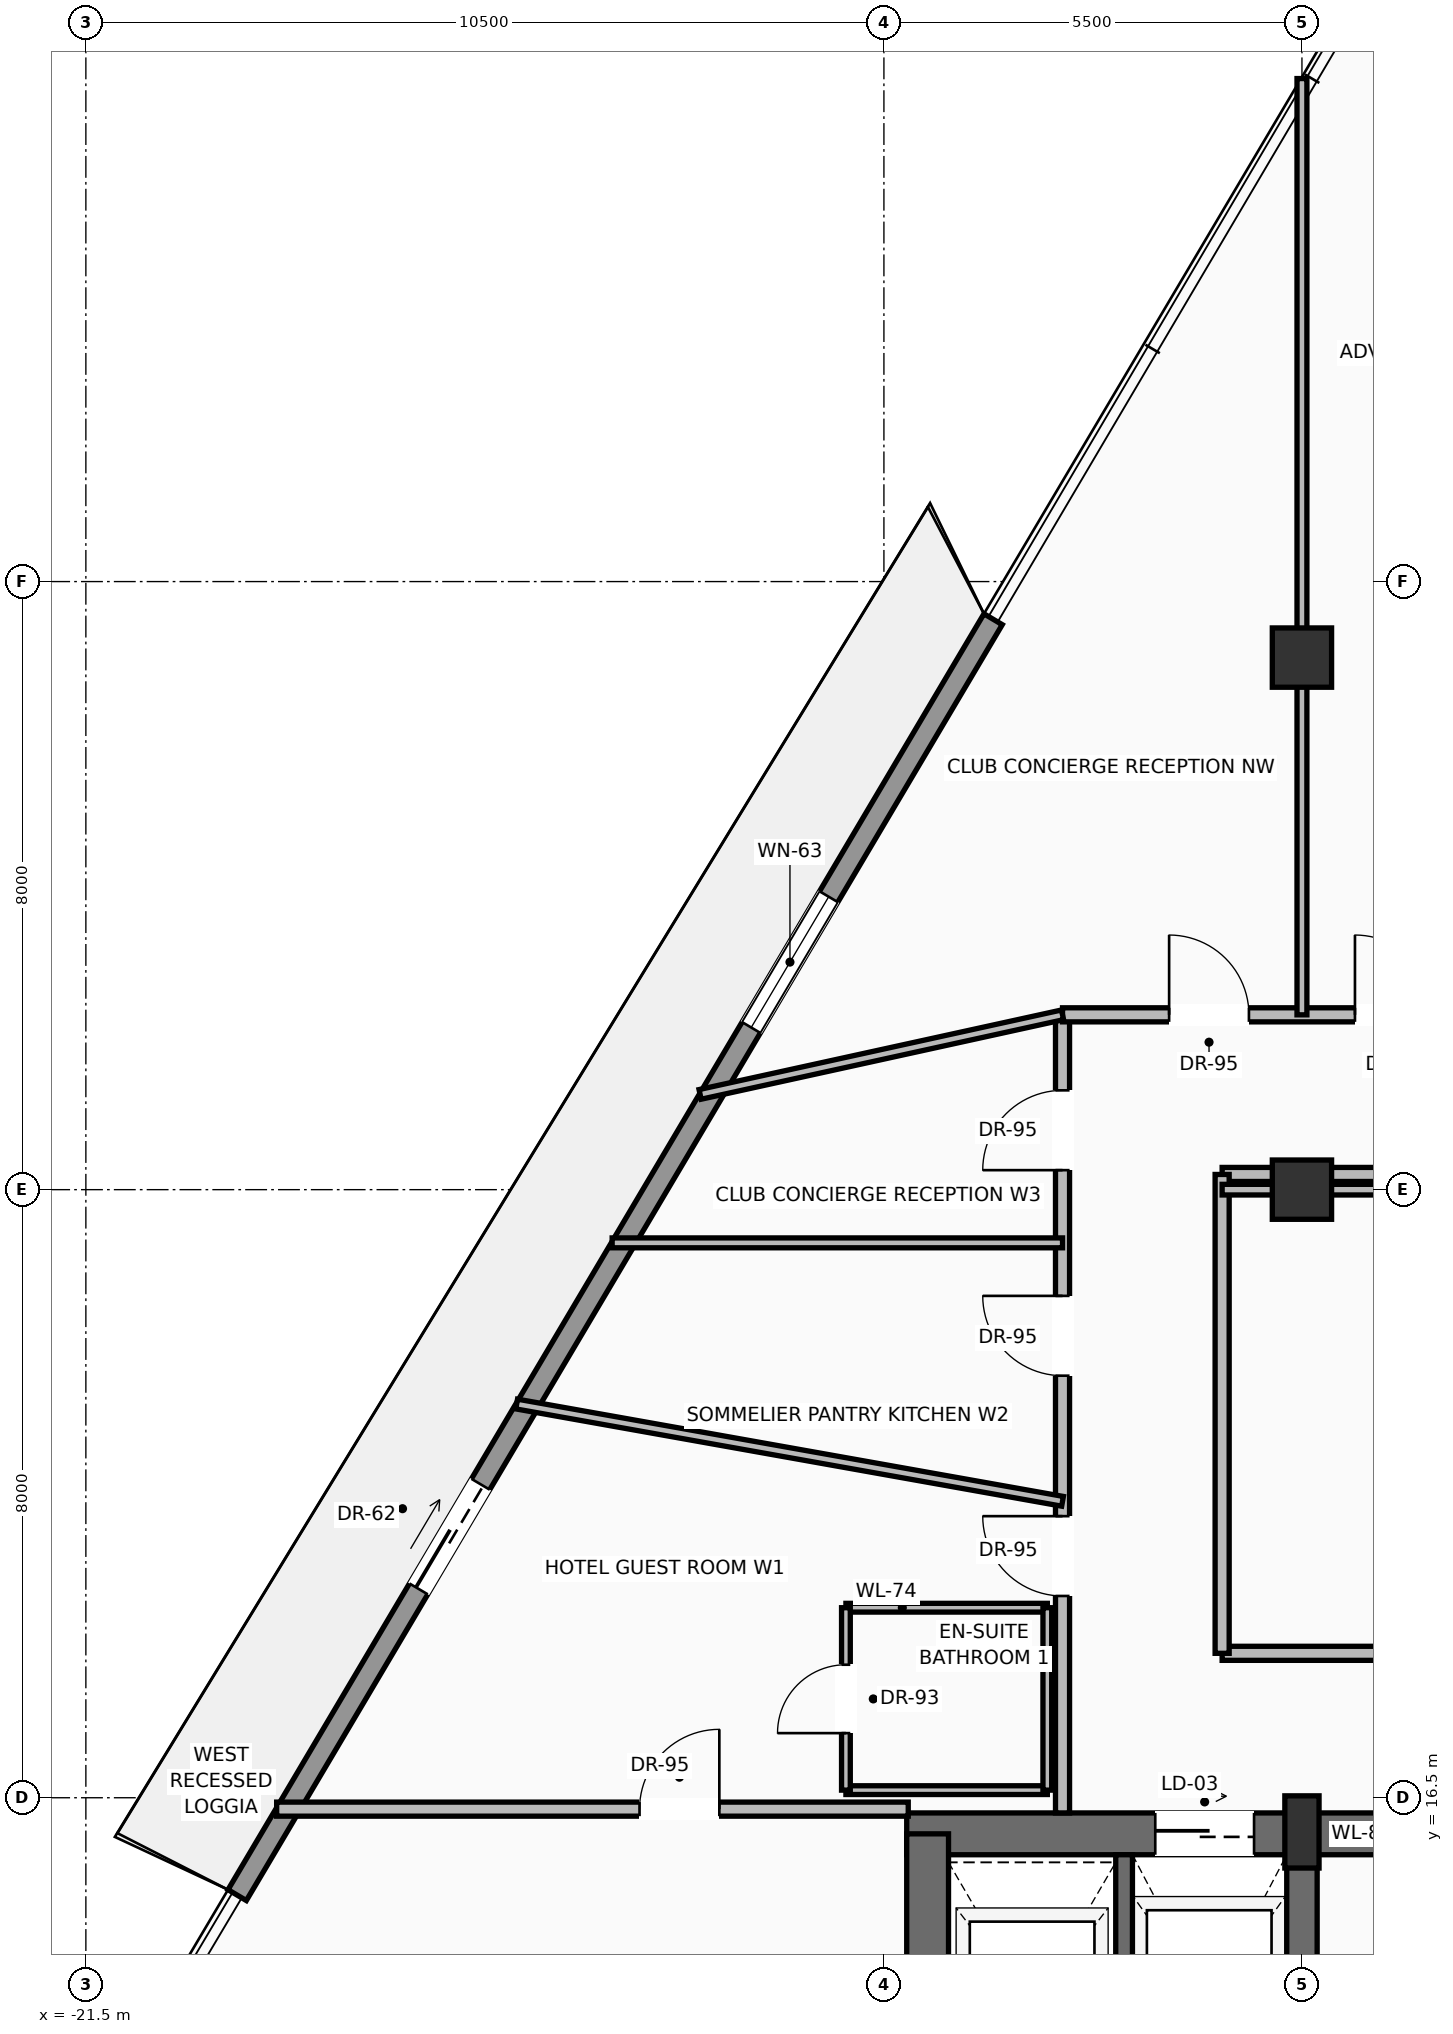
"""IFC4 building model, lengths in metres.
Left out: names, types, materials, properties, quantities, classifications, styles, units other than length and angle.
Written with IfcOpenShell. Run it as: python <this file> out.ifc"""

import sys

from ifc_helpers import new_model, si_unit, direction, frame, frame_2d, origin, origin_2d, place, context, subcontext, project, spatial, rectangle, extrude, source, transform, mapped, element, fill, save


model = new_model("IFC4")
c1 = context("Model", 3, precision=1e-05, world=origin(), true_north=direction((0.0, 1.0)))
c2 = subcontext(c1, "Body", "Model", "MODEL_VIEW")
j1 = project(units=[si_unit("LENGTHUNIT", "METRE"), si_unit("PLANEANGLEUNIT", "RADIAN")], contexts=[c1])
p1 = place(None, origin())
s1 = spatial("IfcSite", under=j1, at=p1, CompositionType="ELEMENT")
p2 = place(p1, origin())
s2 = spatial("IfcBuilding", under=s1, at=p2, CompositionType="ELEMENT")
p3 = place(p2, frame((0.0, 0.0, 233.8)))
s3 = spatial("IfcBuildingStorey", under=s2, at=p3, CompositionType="ELEMENT", Elevation=233.8)
p4 = place(p3, frame((-10.7, 16.025, 0.0), z_axis=(0.0, 0.0, 1.0), x_axis=(1.0, 0.0, 0.0)))
e1 = element("IfcWall", 1, at=p4, inside=s3, PredefinedType="SHEAR", context=c2, shape_type="SweptSolid", body=[
    extrude(rectangle(XDim=21.4, YDim=0.55, at=frame_2d((10.7, 0.0))), origin(), (0.0, 0.0, 1.0), 3.24),
])
p5 = place(p4, frame((3.27, 0.0, 0.0)))
e2 = element("IfcOpeningElement", 2, at=p5, cuts=e1, PredefinedType="OPENING", context=c2, shape_type="SweptSolid", body=[
    extrude(rectangle(XDim=1.3, YDim=2.3, at=frame_2d((0.65, 1.15))), frame((0.0, 0.285, 0.0), z_axis=(0.0, -1.0, 0.0), x_axis=(1.0, 0.0, 0.0)), (0.0, 0.0, 1.0), 0.57),
])
p6 = place(p4, frame((9.7, 0.0, 0.0)))
e3 = element("IfcOpeningElement", 3, at=p6, cuts=e1, PredefinedType="OPENING", context=c2, shape_type="SweptSolid", body=[
    extrude(rectangle(XDim=2.0, YDim=2.4, at=frame_2d((1.0, 1.2))), frame((0.0, 0.285, 0.0), z_axis=(0.0, -1.0, 0.0), x_axis=(1.0, 0.0, 0.0)), (0.0, 0.0, 1.0), 0.57),
])
p7 = place(p3, frame((-10.425, 0.575, 0.0), z_axis=(0.0, 0.0, 1.0), x_axis=(0.0, 1.0, 0.0)))
e4 = element("IfcWall", 4, at=p7, inside=s3, PredefinedType="SHEAR", context=c2, shape_type="SweptSolid", body=[
    extrude(rectangle(XDim=15.45, YDim=0.55, at=frame_2d((7.725, 0.0))), origin(), (0.0, 0.0, 1.0), 3.24),
])
p8 = place(p3, frame((-5.5, 0.575, 0.0), z_axis=(0.0, 0.0, 1.0), x_axis=(0.0, 1.0, 0.0)))
e5 = element("IfcWall", 5, at=p8, inside=s3, PredefinedType="SHEAR", context=c2, shape_type="SweptSolid", body=[
    extrude(rectangle(XDim=15.45, YDim=0.4, at=frame_2d((7.725, 0.0))), origin(), (0.0, 0.0, 1.0), 3.24),
])
p9 = place(p8, frame((8.925, 0.0, 0.0)))
e6 = element("IfcOpeningElement", 6, at=p9, cuts=e5, PredefinedType="OPENING", context=c2, shape_type="SweptSolid", body=[
    extrude(rectangle(XDim=1.1, YDim=2.2, at=frame_2d((0.55, 1.1))), frame((0.0, 0.21, 0.0), z_axis=(0.0, -1.0, 0.0), x_axis=(1.0, 0.0, 0.0)), (0.0, 0.0, 1.0), 0.42),
])
m1 = source(origin(), c2, "Body", "SweptSolid", [
    extrude(rectangle(XDim=0.45, YDim=0.95, at=origin_2d()), origin(), (0.0, 0.0, 1.0), 3.45),
])
p10 = place(p3, frame((-5.5, 16.05, 0.0), z_axis=(0.0, 0.0, 1.0), x_axis=(1.0, 0.0, 0.0)))
e7 = element("IfcColumn", 7, at=p10, inside=s3, PredefinedType="PILASTER", context=c2, shape_type="MappedRepresentation", body=[
    mapped(m1, transform((0.0, 0.0, 0.0), scale=1.0)),
])
m2 = source(origin(), c2, "Body", "SweptSolid", [
    extrude(rectangle(XDim=0.78, YDim=0.78, at=origin_2d()), origin(), (0.0, 0.0, 1.0), 3.45),
])
for number, where, z_axis, x_axis in (
    (8, (-5.5, 24.5, 0.0), (0.0, 0.0, 1.0), (1.0, 0.0, 0.0)),
    (9, (-5.5, 31.5, 0.0), (0.0, 0.0, 1.0), (1.0, 0.0, 0.0)),
):
    element("IfcColumn", number, at=place(p3, frame(where, z_axis=z_axis, x_axis=x_axis)), inside=s3, PredefinedType="COLUMN", context=c2, shape_type="MappedRepresentation", body=[
        mapped(m2, transform((0.0, 0.0, 0.0), scale=1.0)),
    ])
p11 = place(p3, frame((-19.509, 15.219, 0.0), z_axis=(0.0, 0.0, 1.0), x_axis=(0.509744081024, 0.860326084611, 0.0)))
e10 = element("IfcWall", 10, at=p11, inside=s3, PredefinedType="SOLIDWALL", context=c2, shape_type="SweptSolid", body=[
    extrude(rectangle(XDim=19.511, YDim=0.28, at=frame_2d((9.756, 0.0))), origin(), (0.0, 0.0, 1.0), 2.82),
])
p12 = place(p11, frame((4.683, 0.0, 0.0)))
e11 = element("IfcOpeningElement", 11, at=p12, cuts=e10, PredefinedType="OPENING", context=c2, shape_type="SweptSolid", body=[
    extrude(rectangle(XDim=1.6, YDim=2.35, at=frame_2d((0.8, 1.175))), frame((0.0, 0.15, 0.0), z_axis=(0.0, -1.0, 0.0), x_axis=(1.0, 0.0, 0.0)), (0.0, 0.0, 1.0), 0.3),
])
p13 = place(p11, frame((13.268, 0.0, 0.9)))
e12 = element("IfcOpeningElement", 12, at=p13, cuts=e10, PredefinedType="OPENING", context=c2, shape_type="SweptSolid", body=[
    extrude(rectangle(XDim=2.0, YDim=1.75, at=frame_2d((1.0, 0.875))), frame((0.0, 0.15, 0.0), z_axis=(0.0, -1.0, 0.0), x_axis=(1.0, 0.0, 0.0)), (0.0, 0.0, 1.0), 0.3),
])
p14 = place(p3, frame((-7.84, 11.87, 0.0), z_axis=(0.0, 0.0, 1.0), x_axis=(0.0, 1.0, 0.0)))
e13 = element("IfcWall", 13, at=p14, inside=s3, PredefinedType="SOLIDWALL", context=c2, shape_type="SweptSolid", body=[
    extrude(rectangle(XDim=3.88, YDim=0.22, at=frame_2d((1.94, 0.0))), origin(), (0.0, 0.0, 1.0), 3.24),
])
p15 = place(p3, frame((-6.55, 18.4, 0.0), z_axis=(0.0, 0.0, 1.0), x_axis=(1.0, 0.0, 0.0)))
e14 = element("IfcWall", 14, at=p15, inside=s3, PredefinedType="PARTITIONING", context=c2, shape_type="SweptSolid", body=[
    extrude(rectangle(XDim=12.4, YDim=0.185, at=frame_2d((6.2, 0.0))), origin(), (0.0, 0.0, 1.0), 3.232),
])
p16 = place(p15, frame((5.725, 0.0, 0.0)))
e15 = element("IfcOpeningElement", 15, at=p16, cuts=e14, PredefinedType="OPENING", context=c2, shape_type="SweptSolid", body=[
    extrude(rectangle(XDim=0.95, YDim=2.2, at=frame_2d((0.475, 1.1))), frame((0.0, 0.103, 0.0), z_axis=(0.0, -1.0, 0.0), x_axis=(1.0, 0.0, 0.0)), (0.0, 0.0, 1.0), 0.205),
])
p17 = place(p3, frame((-6.55, 24.7, 0.0), z_axis=(0.0, 0.0, 1.0), x_axis=(1.0, 0.0, 0.0)))
e16 = element("IfcWall", 16, at=p17, inside=s3, PredefinedType="PARTITIONING", context=c2, shape_type="SweptSolid", body=[
    extrude(rectangle(XDim=12.4, YDim=0.185, at=frame_2d((6.2, 0.0))), origin(), (0.0, 0.0, 1.0), 2.683),
])
p18 = place(p3, frame((-6.55, 18.4, 0.0), z_axis=(0.0, 0.0, 1.0), x_axis=(0.0, 1.0, 0.0)))
e17 = element("IfcWall", 17, at=p18, inside=s3, PredefinedType="PARTITIONING", context=c2, shape_type="SweptSolid", body=[
    extrude(rectangle(XDim=6.3, YDim=0.185, at=frame_2d((3.15, 0.0))), origin(), (0.0, 0.0, 1.0), 3.232),
])
p19 = place(p3, frame((-8.65, 16.3, 0.0), z_axis=(0.0, 0.0, 1.0), x_axis=(0.0, 1.0, 0.0)))
e18 = element("IfcWall", 18, at=p19, inside=s3, PredefinedType="PARTITIONING", context=c2, shape_type="SweptSolid", body=[
    extrude(rectangle(XDim=10.5, YDim=0.185, at=frame_2d((5.25, 0.0))), origin(), (0.0, 0.0, 1.0), 3.232),
])
p20 = place(p19, frame((2.854, 0.0, 0.0)))
e19 = element("IfcOpeningElement", 19, at=p20, cuts=e18, PredefinedType="OPENING", context=c2, shape_type="SweptSolid", body=[
    extrude(rectangle(XDim=1.05, YDim=2.25, at=frame_2d((0.525, 1.125))), frame((0.0, 0.103, 0.0), z_axis=(0.0, -1.0, 0.0), x_axis=(1.0, 0.0, 0.0)), (0.0, 0.0, 1.0), 0.205),
])
p21 = place(p19, frame((5.752, 0.0, 0.0)))
e20 = element("IfcOpeningElement", 20, at=p21, cuts=e18, PredefinedType="OPENING", context=c2, shape_type="SweptSolid", body=[
    extrude(rectangle(XDim=1.05, YDim=2.25, at=frame_2d((0.525, 1.125))), frame((0.0, 0.103, 0.0), z_axis=(0.0, -1.0, 0.0), x_axis=(1.0, 0.0, 0.0)), (0.0, 0.0, 1.0), 0.205),
])
p22 = place(p19, frame((8.457, 0.0, 0.0)))
e21 = element("IfcOpeningElement", 21, at=p22, cuts=e18, PredefinedType="OPENING", context=c2, shape_type="SweptSolid", body=[
    extrude(rectangle(XDim=1.05, YDim=2.25, at=frame_2d((0.525, 1.125))), frame((0.0, 0.103, 0.0), z_axis=(0.0, -1.0, 0.0), x_axis=(1.0, 0.0, 0.0)), (0.0, 0.0, 1.0), 0.205),
])
p23 = place(p3, frame((-8.65, 26.8, 0.0), z_axis=(0.0, 0.0, 1.0), x_axis=(1.0, 0.0, 0.0)))
e22 = element("IfcWall", 22, at=p23, inside=s3, PredefinedType="PARTITIONING", context=c2, shape_type="SweptSolid", body=[
    extrude(rectangle(XDim=16.6, YDim=0.185, at=frame_2d((8.3, 0.0))), origin(), (0.0, 0.0, 1.0), 3.232),
])
p24 = place(p23, frame((3.847, 0.0, 0.0)))
e23 = element("IfcOpeningElement", 23, at=p24, cuts=e22, PredefinedType="OPENING", context=c2, shape_type="SweptSolid", body=[
    extrude(rectangle(XDim=1.05, YDim=2.25, at=frame_2d((0.525, 1.125))), frame((0.0, 0.103, 0.0), z_axis=(0.0, -1.0, 0.0), x_axis=(1.0, 0.0, 0.0)), (0.0, 0.0, 1.0), 0.205),
])
p25 = place(p23, frame((6.903, 0.0, 0.0)))
e24 = element("IfcOpeningElement", 24, at=p25, cuts=e22, PredefinedType="OPENING", context=c2, shape_type="SweptSolid", body=[
    extrude(rectangle(XDim=1.05, YDim=2.25, at=frame_2d((0.525, 1.125))), frame((0.0, 0.103, 0.0), z_axis=(0.0, -1.0, 0.0), x_axis=(1.0, 0.0, 0.0)), (0.0, 0.0, 1.0), 0.205),
])
p26 = place(p23, frame((12.403, 0.0, 0.0)))
e25 = element("IfcOpeningElement", 25, at=p26, cuts=e22, PredefinedType="OPENING", context=c2, shape_type="SweptSolid", body=[
    extrude(rectangle(XDim=1.05, YDim=2.25, at=frame_2d((0.525, 1.125))), frame((0.0, 0.103, 0.0), z_axis=(0.0, -1.0, 0.0), x_axis=(1.0, 0.0, 0.0)), (0.0, 0.0, 1.0), 0.205),
])
p27 = place(p23, frame((1.403, 0.0, 0.0)))
e26 = element("IfcOpeningElement", 26, at=p27, cuts=e22, PredefinedType="OPENING", context=c2, shape_type="SweptSolid", body=[
    extrude(rectangle(XDim=1.05, YDim=2.25, at=frame_2d((0.525, 1.125))), frame((0.0, 0.103, 0.0), z_axis=(0.0, -1.0, 0.0), x_axis=(1.0, 0.0, 0.0)), (0.0, 0.0, 1.0), 0.205),
])
p28 = place(p3, frame((-6.55, 24.5, 0.0), z_axis=(0.0, 0.0, 1.0), x_axis=(1.0, 0.0, 0.0)))
e27 = element("IfcWall", 27, at=p28, inside=s3, PredefinedType="PARTITIONING", context=c2, shape_type="SweptSolid", body=[
    extrude(rectangle(XDim=12.4, YDim=0.14, at=frame_2d((6.2, 0.0))), origin(), (0.0, 0.0, 1.0), 2.683),
])
p29 = place(p3, frame((-18.99, 16.35, 0.0), z_axis=(0.0, 0.0, 1.0), x_axis=(1.0, 0.0, 0.0)))
e28 = element("IfcWall", 28, at=p29, inside=s3, PredefinedType="PARTITIONING", context=c2, shape_type="SweptSolid", body=[
    extrude(rectangle(XDim=8.31, YDim=0.185, at=frame_2d((4.155, 0.0))), origin(), (0.0, 0.0, 1.0), 3.232),
])
p30 = place(p29, frame((4.774, 0.0, 0.0)))
e29 = element("IfcOpeningElement", 29, at=p30, cuts=e28, PredefinedType="OPENING", context=c2, shape_type="SweptSolid", body=[
    extrude(rectangle(XDim=1.05, YDim=2.25, at=frame_2d((0.525, 1.125))), frame((0.0, 0.103, 0.0), z_axis=(0.0, -1.0, 0.0), x_axis=(1.0, 0.0, 0.0)), (0.0, 0.0, 1.0), 0.205),
])
p31 = place(p3, frame((-13.418, 25.753, 0.0), z_axis=(0.0, 0.0, 1.0), x_axis=(0.976739234334, 0.214430567112, 0.0)))
e30 = element("IfcWall", 30, at=p31, inside=s3, PredefinedType="PARTITIONING", context=c2, shape_type="SweptSolid", body=[
    extrude(rectangle(XDim=4.882, YDim=0.13, at=frame_2d((2.441, 0.0))), origin(), (0.0, 0.0, 1.0), 3.232),
])
p32 = place(p3, frame((-5.5, 26.8, 0.0), z_axis=(0.0, 0.0, 1.0), x_axis=(0.0, 1.0, 0.0)))
e31 = element("IfcWall", 31, at=p32, inside=s3, PredefinedType="PARTITIONING", context=c2, shape_type="SweptSolid", body=[
    extrude(rectangle(XDim=12.318, YDim=0.13, at=frame_2d((6.159, 0.0))), origin(), (0.0, 0.0, 1.0), 2.683),
])
for number, where, z_axis, x_axis in (
    (32, (-11.5, 16.6, 0.0), (0.0, 0.0, 1.0), (1.0, 0.0, 0.0)),
    (33, (-11.5, 19.0, 0.0), (0.0, 0.0, 1.0), (1.0, 0.0, 0.0)),
):
    element("IfcWall", number, at=place(p3, frame(where, z_axis=z_axis, x_axis=x_axis)), inside=s3, PredefinedType="PARTITIONING", context=c2, shape_type="SweptSolid", body=[
        extrude(rectangle(XDim=2.65, YDim=0.115, at=frame_2d((1.325, 0.0))), origin(), (0.0, 0.0, 1.0), 3.232),
    ])
p33 = place(p3, frame((-11.5, 16.6, 0.0), z_axis=(0.0, 0.0, 1.0), x_axis=(0.0, 1.0, 0.0)))
e34 = element("IfcWall", 34, at=p33, inside=s3, PredefinedType="PARTITIONING", context=c2, shape_type="SweptSolid", body=[
    extrude(rectangle(XDim=2.4, YDim=0.115, at=frame_2d((1.2, 0.0))), origin(), (0.0, 0.0, 1.0), 3.232),
])
p34 = place(p33, frame((0.75, 0.0, 0.0)))
e35 = element("IfcOpeningElement", 35, at=p34, cuts=e34, PredefinedType="OPENING", context=c2, shape_type="SweptSolid", body=[
    extrude(rectangle(XDim=0.9, YDim=2.15, at=frame_2d((0.45, 1.075))), frame((0.0, 0.067, 0.0), z_axis=(0.0, -1.0, 0.0), x_axis=(1.0, 0.0, 0.0)), (0.0, 0.0, 1.0), 0.135),
])
p35 = place(p3, frame((-8.85, 16.6, 0.0), z_axis=(0.0, 0.0, 1.0), x_axis=(0.0, 1.0, 0.0)))
e36 = element("IfcWall", 36, at=p35, inside=s3, PredefinedType="PARTITIONING", context=c2, shape_type="SweptSolid", body=[
    extrude(rectangle(XDim=2.4, YDim=0.115, at=frame_2d((1.2, 0.0))), origin(), (0.0, 0.0, 1.0), 3.232),
])
p36 = place(p3, frame((-15.832, 21.68, 0.0), z_axis=(0.0, 0.0, 1.0), x_axis=(0.984492454021, -0.175426930586, 0.0)))
e37 = element("IfcWall", 37, at=p36, inside=s3, PredefinedType="PARTITIONING", context=c2, shape_type="SweptSolid", body=[
    extrude(rectangle(XDim=7.295, YDim=0.13, at=frame_2d((3.647, 0.0))), origin(), (0.0, 0.0, 1.0), 3.232),
])
p37 = place(p3, frame((-14.576, 23.8, 0.0), z_axis=(0.0, 0.0, 1.0), x_axis=(1.0, 0.0, 0.0)))
e38 = element("IfcWall", 38, at=p37, inside=s3, PredefinedType="PARTITIONING", context=c2, shape_type="SweptSolid", body=[
    extrude(rectangle(XDim=5.926, YDim=0.13, at=frame_2d((2.963, 0.0))), origin(), (0.0, 0.0, 1.0), 3.232),
])
m3 = source(origin(), c2, "Body", "SweptSolid", [
    extrude(rectangle(XDim=1.6, YDim=2.35, at=frame_2d((0.8, 1.175))), frame((0.0, 0.025, 0.0), z_axis=(0.0, -1.0, 0.0), x_axis=(1.0, 0.0, 0.0)), (0.0, 0.0, 1.0), 0.05),
])
p38 = place(p12, origin())
e39 = element("IfcDoor", 39, at=p38, inside=s3, OperationType="SLIDING_TO_LEFT", PredefinedType="DOOR", context=c2, shape_type="MappedRepresentation", body=[
    mapped(m3, transform((0.0, 0.0, 0.0), scale=1.0)),
])
fill(e11, e39)
m4 = source(origin(), c2, "Body", "SweptSolid", [
    extrude(rectangle(XDim=2.0, YDim=1.75, at=frame_2d((1.0, 0.875))), frame((0.0, 0.03, 0.0), z_axis=(0.0, -1.0, 0.0), x_axis=(1.0, 0.0, 0.0)), (0.0, 0.0, 1.0), 0.06),
])
p39 = place(p13, origin())
e40 = element("IfcWindow", 40, at=p39, inside=s3, PartitioningType="SINGLE_PANEL", PredefinedType="WINDOW", context=c2, shape_type="MappedRepresentation", body=[
    mapped(m4, transform((0.0, 0.0, 0.0), scale=1.0)),
])
fill(e12, e40)
m5 = source(origin(), c2, "Body", "SweptSolid", [
    extrude(rectangle(XDim=1.3, YDim=2.3, at=frame_2d((0.65, 1.15))), frame((0.0, 0.025, 0.0), z_axis=(0.0, -1.0, 0.0), x_axis=(1.0, 0.0, 0.0)), (0.0, 0.0, 1.0), 0.05),
])
p40 = place(p5, origin())
e41 = element("IfcDoor", 41, at=p40, inside=s3, OperationType="SLIDING_TO_RIGHT", PredefinedType="DOOR", context=c2, shape_type="MappedRepresentation", body=[
    mapped(m5, transform((0.0, 0.0, 0.0), scale=1.0)),
])
fill(e2, e41)
m6 = source(origin(), c2, "Body", "SweptSolid", [
    extrude(rectangle(XDim=1.05, YDim=2.25, at=frame_2d((0.525, 1.125))), frame((0.0, 0.025, 0.0), z_axis=(0.0, -1.0, 0.0), x_axis=(1.0, 0.0, 0.0)), (0.0, 0.0, 1.0), 0.05),
])
p41 = place(p30, origin())
e42 = element("IfcDoor", 42, at=p41, inside=s3, OperationType="SINGLE_SWING_RIGHT", PredefinedType="DOOR", context=c2, shape_type="MappedRepresentation", body=[
    mapped(m6, transform((0.0, 0.0, 0.0), scale=1.0)),
])
fill(e29, e42)
p42 = place(p20, origin())
e43 = element("IfcDoor", 43, at=p42, inside=s3, OperationType="SINGLE_SWING_RIGHT", PredefinedType="DOOR", context=c2, shape_type="MappedRepresentation", body=[
    mapped(m6, transform((0.0, 0.0, 0.0), scale=1.0)),
])
fill(e19, e43)
m7 = source(origin(), c2, "Body", "SweptSolid", [
    extrude(rectangle(XDim=0.9, YDim=2.15, at=frame_2d((0.45, 1.075))), frame((0.0, 0.025, 0.0), z_axis=(0.0, -1.0, 0.0), x_axis=(1.0, 0.0, 0.0)), (0.0, 0.0, 1.0), 0.05),
])
p43 = place(p34, origin())
e44 = element("IfcDoor", 44, at=p43, inside=s3, OperationType="SINGLE_SWING_LEFT", PredefinedType="DOOR", context=c2, shape_type="MappedRepresentation", body=[
    mapped(m7, transform((0.0, 0.0, 0.0), scale=1.0)),
])
fill(e35, e44)
p44 = place(p21, origin())
e45 = element("IfcDoor", 45, at=p44, inside=s3, OperationType="SINGLE_SWING_RIGHT", PredefinedType="DOOR", context=c2, shape_type="MappedRepresentation", body=[
    mapped(m6, transform((0.0, 0.0, 0.0), scale=1.0)),
])
fill(e20, e45)
p45 = place(p22, origin())
e46 = element("IfcDoor", 46, at=p45, inside=s3, OperationType="SINGLE_SWING_LEFT", PredefinedType="DOOR", context=c2, shape_type="MappedRepresentation", body=[
    mapped(m6, transform((0.0, 0.0, 0.0), scale=1.0)),
])
fill(e21, e46)
p46 = place(p24, origin())
e47 = element("IfcDoor", 47, at=p46, inside=s3, OperationType="SINGLE_SWING_LEFT", PredefinedType="DOOR", context=c2, shape_type="MappedRepresentation", body=[
    mapped(m6, transform((0.0, 0.0, 0.0), scale=1.0)),
])
fill(e23, e47)
p47 = place(p27, origin())
e48 = element("IfcDoor", 48, at=p47, inside=s3, OperationType="SINGLE_SWING_LEFT", PredefinedType="DOOR", context=c2, shape_type="MappedRepresentation", body=[
    mapped(m6, transform((0.0, 0.0, 0.0), scale=1.0)),
])
fill(e26, e48)
save(model, sys.argv[1])
